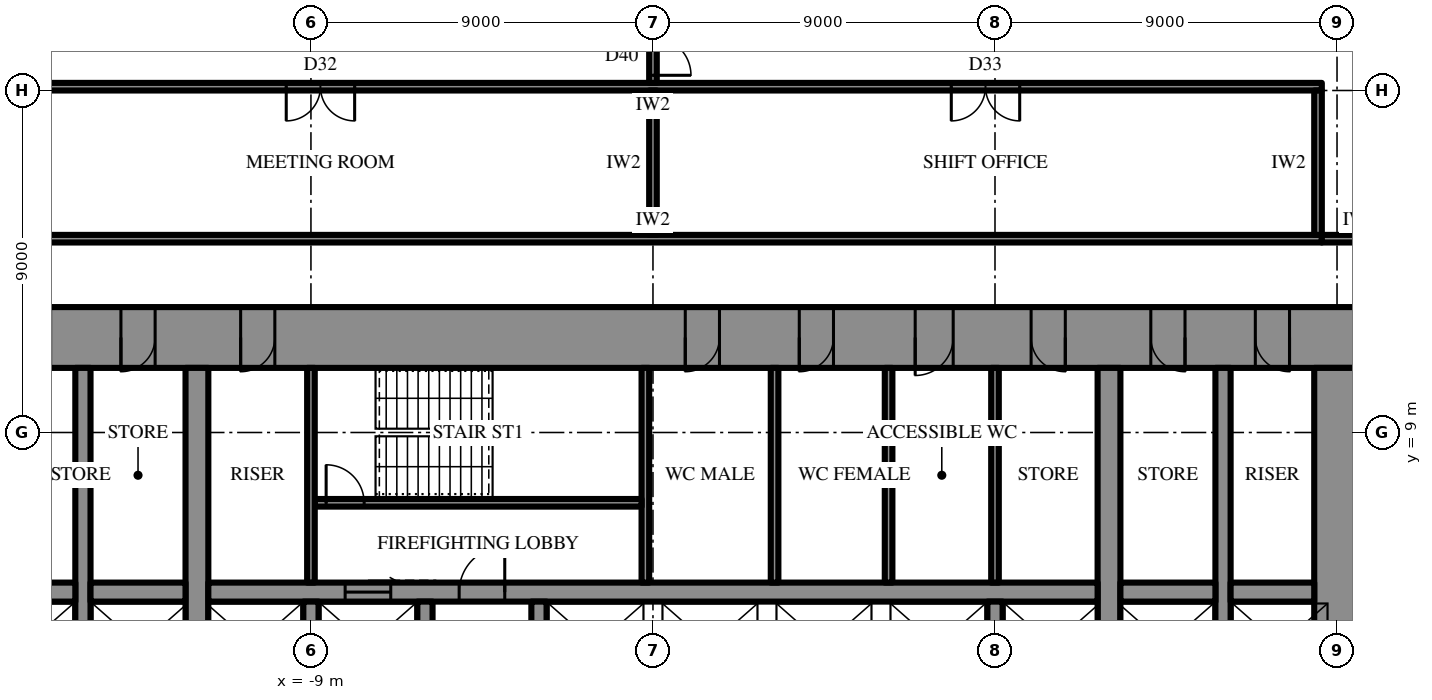
"""IFC4 building model, lengths in metres.
Left out: names, types, materials, properties, quantities, classifications, styles, units other than length and angle.
Written with IfcOpenShell. Run it as: python <this file> out.ifc"""

import sys

from ifc_helpers import new_model, si_unit, direction, frame, frame_2d, origin, place, context, subcontext, project, spatial, rectangle, extrude, element, fill, save


model = new_model("IFC4")
c1 = context("Model", 3, precision=1e-05, world=origin(), true_north=direction((0.0, 1.0)))
c2 = subcontext(c1, "Body", "Model", "MODEL_VIEW")
j1 = project(units=[si_unit("LENGTHUNIT", "METRE"), si_unit("PLANEANGLEUNIT", "RADIAN")], contexts=[c1])
p1 = place(None, origin())
s1 = spatial("IfcSite", under=j1, at=p1, CompositionType="ELEMENT")
p2 = place(p1, origin())
s2 = spatial("IfcBuilding", under=s1, at=p2, CompositionType="ELEMENT")
p3 = place(p2, frame((0.0, 0.0, 27.7)))
s3 = spatial("IfcBuildingStorey", under=s2, at=p3, CompositionType="ELEMENT", Elevation=27.7)
p4 = place(p3, frame((-18.6, 11.5, 0.0), z_axis=(0.0, 0.0, 1.0), x_axis=(1.0, 0.0, 0.0)))
e1 = element("IfcWall", 1, at=p4, inside=s3, PredefinedType="SHEAR", context=c2, shape_type="SweptSolid", body=[
    extrude(rectangle(XDim=37.2, YDim=1.6, at=frame_2d((18.6, 0.0))), origin(), (0.0, 0.0, 1.0), 4.2),
])
p5 = place(p4, frame((19.45, 0.0, 0.0)))
e2 = element("IfcOpeningElement", 2, at=p5, cuts=e1, PredefinedType="OPENING", context=c2, shape_type="SweptSolid", body=[
    extrude(rectangle(XDim=0.9, YDim=2.2, at=frame_2d((0.45, 1.1))), frame((0.0, 0.81, 0.0), z_axis=(0.0, -1.0, 0.0), x_axis=(1.0, 0.0, 0.0)), (0.0, 0.0, 1.0), 1.62),
])
p6 = place(p4, frame((22.45, 0.0, 0.0)))
e3 = element("IfcOpeningElement", 3, at=p6, cuts=e1, PredefinedType="OPENING", context=c2, shape_type="SweptSolid", body=[
    extrude(rectangle(XDim=0.9, YDim=2.2, at=frame_2d((0.45, 1.1))), frame((0.0, 0.81, 0.0), z_axis=(0.0, -1.0, 0.0), x_axis=(1.0, 0.0, 0.0)), (0.0, 0.0, 1.0), 1.62),
])
p7 = place(p4, frame((25.5, 0.0, 0.0)))
e4 = element("IfcOpeningElement", 4, at=p7, cuts=e1, PredefinedType="OPENING", context=c2, shape_type="SweptSolid", body=[
    extrude(rectangle(XDim=1.0, YDim=2.2, at=frame_2d((0.5, 1.1))), frame((0.0, 0.81, 0.0), z_axis=(0.0, -1.0, 0.0), x_axis=(1.0, 0.0, 0.0)), (0.0, 0.0, 1.0), 1.62),
])
p8 = place(p4, frame((1.85, 0.0, 0.0)))
e5 = element("IfcOpeningElement", 5, at=p8, cuts=e1, PredefinedType="OPENING", context=c2, shape_type="SweptSolid", body=[
    extrude(rectangle(XDim=0.9, YDim=2.2, at=frame_2d((0.45, 1.1))), frame((0.0, 0.81, 0.0), z_axis=(0.0, -1.0, 0.0), x_axis=(1.0, 0.0, 0.0)), (0.0, 0.0, 1.0), 1.62),
])
p9 = place(p4, frame((4.6, 0.0, 0.0)))
e6 = element("IfcOpeningElement", 6, at=p9, cuts=e1, PredefinedType="OPENING", context=c2, shape_type="SweptSolid", body=[
    extrude(rectangle(XDim=0.9, YDim=2.2, at=frame_2d((0.45, 1.1))), frame((0.0, 0.81, 0.0), z_axis=(0.0, -1.0, 0.0), x_axis=(1.0, 0.0, 0.0)), (0.0, 0.0, 1.0), 1.62),
])
p10 = place(p4, frame((7.75, 0.0, 0.0)))
e7 = element("IfcOpeningElement", 7, at=p10, cuts=e1, PredefinedType="OPENING", context=c2, shape_type="SweptSolid", body=[
    extrude(rectangle(XDim=0.9, YDim=2.2, at=frame_2d((0.45, 1.1))), frame((0.0, 0.81, 0.0), z_axis=(0.0, -1.0, 0.0), x_axis=(1.0, 0.0, 0.0)), (0.0, 0.0, 1.0), 1.62),
])
p11 = place(p4, frame((28.55, 0.0, 0.0)))
e8 = element("IfcOpeningElement", 8, at=p11, cuts=e1, PredefinedType="OPENING", context=c2, shape_type="SweptSolid", body=[
    extrude(rectangle(XDim=0.9, YDim=2.2, at=frame_2d((0.45, 1.1))), frame((0.0, 0.81, 0.0), z_axis=(0.0, -1.0, 0.0), x_axis=(1.0, 0.0, 0.0)), (0.0, 0.0, 1.0), 1.62),
])
p12 = place(p4, frame((31.7, 0.0, 0.0)))
e9 = element("IfcOpeningElement", 9, at=p12, cuts=e1, PredefinedType="OPENING", context=c2, shape_type="SweptSolid", body=[
    extrude(rectangle(XDim=0.9, YDim=2.2, at=frame_2d((0.45, 1.1))), frame((0.0, 0.81, 0.0), z_axis=(0.0, -1.0, 0.0), x_axis=(1.0, 0.0, 0.0)), (0.0, 0.0, 1.0), 1.62),
])
p13 = place(p4, frame((34.45, 0.0, 0.0)))
e10 = element("IfcOpeningElement", 10, at=p13, cuts=e1, PredefinedType="OPENING", context=c2, shape_type="SweptSolid", body=[
    extrude(rectangle(XDim=0.9, YDim=2.2, at=frame_2d((0.45, 1.1))), frame((0.0, 0.81, 0.0), z_axis=(0.0, -1.0, 0.0), x_axis=(1.0, 0.0, 0.0)), (0.0, 0.0, 1.0), 1.62),
])
p14 = place(p3, frame((18.0, -10.7, 0.0), z_axis=(0.0, 0.0, 1.0), x_axis=(0.0, 1.0, 0.0)))
e11 = element("IfcWall", 11, at=p14, inside=s3, PredefinedType="SHEAR", context=c2, shape_type="SweptSolid", body=[
    extrude(rectangle(XDim=21.4, YDim=1.2, at=frame_2d((10.7, 0.0))), origin(), (0.0, 0.0, 1.0), 4.2),
])
p15 = place(p14, frame((9.8, 0.0, 0.0)))
e12 = element("IfcOpeningElement", 12, at=p15, cuts=e11, PredefinedType="OPENING", context=c2, shape_type="SweptSolid", body=[
    extrude(rectangle(XDim=1.8, YDim=2.4, at=frame_2d((0.9, 1.2))), frame((0.0, 0.61, 0.0), z_axis=(0.0, -1.0, 0.0), x_axis=(1.0, 0.0, 0.0)), (0.0, 0.0, 1.0), 1.22),
])
p16 = place(p3, frame((12.0, -10.7, 0.0), z_axis=(0.0, 0.0, 1.0), x_axis=(0.0, 1.0, 0.0)))
e13 = element("IfcWall", 13, at=p16, inside=s3, PredefinedType="SHEAR", context=c2, shape_type="SweptSolid", body=[
    extrude(rectangle(XDim=21.4, YDim=0.6, at=frame_2d((10.7, 0.0))), origin(), (0.0, 0.0, 1.0), 4.2),
])
p17 = place(p16, frame((9.8, 0.0, 0.0)))
e14 = element("IfcOpeningElement", 14, at=p17, cuts=e13, PredefinedType="OPENING", context=c2, shape_type="SweptSolid", body=[
    extrude(rectangle(XDim=1.8, YDim=2.4, at=frame_2d((0.9, 1.2))), frame((0.0, 0.31, 0.0), z_axis=(0.0, -1.0, 0.0), x_axis=(1.0, 0.0, 0.0)), (0.0, 0.0, 1.0), 0.62),
])
p18 = place(p3, frame((-12.0, -10.7, 0.0), z_axis=(0.0, 0.0, 1.0), x_axis=(0.0, 1.0, 0.0)))
e15 = element("IfcWall", 15, at=p18, inside=s3, PredefinedType="SHEAR", context=c2, shape_type="SweptSolid", body=[
    extrude(rectangle(XDim=21.4, YDim=0.6, at=frame_2d((10.7, 0.0))), origin(), (0.0, 0.0, 1.0), 4.2),
])
p19 = place(p18, frame((9.8, 0.0, 0.0)))
e16 = element("IfcOpeningElement", 16, at=p19, cuts=e15, PredefinedType="OPENING", context=c2, shape_type="SweptSolid", body=[
    extrude(rectangle(XDim=1.8, YDim=2.4, at=frame_2d((0.9, 1.2))), frame((0.0, 0.31, 0.0), z_axis=(0.0, -1.0, 0.0), x_axis=(1.0, 0.0, 0.0)), (0.0, 0.0, 1.0), 0.62),
])
p20 = place(p3, frame((15.0, -10.7, 0.0), z_axis=(0.0, 0.0, 1.0), x_axis=(0.0, 1.0, 0.0)))
e17 = element("IfcWall", 17, at=p20, inside=s3, PredefinedType="SHEAR", context=c2, shape_type="SweptSolid", body=[
    extrude(rectangle(XDim=21.4, YDim=0.4, at=frame_2d((10.7, 0.0))), origin(), (0.0, 0.0, 1.0), 4.2),
])
p21 = place(p20, frame((9.8, 0.0, 0.0)))
e18 = element("IfcOpeningElement", 18, at=p21, cuts=e17, PredefinedType="OPENING", context=c2, shape_type="SweptSolid", body=[
    extrude(rectangle(XDim=1.8, YDim=2.4, at=frame_2d((0.9, 1.2))), frame((0.0, 0.21, 0.0), z_axis=(0.0, -1.0, 0.0), x_axis=(1.0, 0.0, 0.0)), (0.0, 0.0, 1.0), 0.42),
])
p22 = place(p3, frame((-15.0, -10.7, 0.0), z_axis=(0.0, 0.0, 1.0), x_axis=(0.0, 1.0, 0.0)))
e19 = element("IfcWall", 19, at=p22, inside=s3, PredefinedType="SHEAR", context=c2, shape_type="SweptSolid", body=[
    extrude(rectangle(XDim=21.4, YDim=0.4, at=frame_2d((10.7, 0.0))), origin(), (0.0, 0.0, 1.0), 4.2),
])
p23 = place(p22, frame((9.8, 0.0, 0.0)))
e20 = element("IfcOpeningElement", 20, at=p23, cuts=e19, PredefinedType="OPENING", context=c2, shape_type="SweptSolid", body=[
    extrude(rectangle(XDim=1.8, YDim=2.4, at=frame_2d((0.9, 1.2))), frame((0.0, 0.21, 0.0), z_axis=(0.0, -1.0, 0.0), x_axis=(1.0, 0.0, 0.0)), (0.0, 0.0, 1.0), 0.42),
])
p24 = place(p3, frame((-17.4, 4.8, 0.0), z_axis=(0.0, 0.0, 1.0), x_axis=(1.0, 0.0, 0.0)))
e21 = element("IfcWall", 21, at=p24, inside=s3, PredefinedType="SHEAR", context=c2, shape_type="SweptSolid", body=[
    extrude(rectangle(XDim=2.2, YDim=0.5, at=frame_2d((1.1, 0.0))), origin(), (0.0, 0.0, 1.0), 4.2),
])
p25 = place(p3, frame((-14.8, 4.8, 0.0), z_axis=(0.0, 0.0, 1.0), x_axis=(1.0, 0.0, 0.0)))
e22 = element("IfcWall", 22, at=p25, inside=s3, PredefinedType="SHEAR", context=c2, shape_type="SweptSolid", body=[
    extrude(rectangle(XDim=2.5, YDim=0.5, at=frame_2d((1.25, 0.0))), origin(), (0.0, 0.0, 1.0), 4.2),
])
p26 = place(p3, frame((-11.7, 4.8, 0.0), z_axis=(0.0, 0.0, 1.0), x_axis=(1.0, 0.0, 0.0)))
e23 = element("IfcWall", 23, at=p26, inside=s3, PredefinedType="SHEAR", context=c2, shape_type="SweptSolid", body=[
    extrude(rectangle(XDim=23.4, YDim=0.5, at=frame_2d((11.7, 0.0))), origin(), (0.0, 0.0, 1.0), 4.2),
])
p27 = place(p26, frame((6.6, 0.0, 0.0)))
e24 = element("IfcOpeningElement", 24, at=p27, cuts=e23, PredefinedType="OPENING", context=c2, shape_type="SweptSolid", body=[
    extrude(rectangle(XDim=1.2, YDim=2.2, at=frame_2d((0.6, 1.1))), frame((0.0, 0.26, 0.0), z_axis=(0.0, -1.0, 0.0), x_axis=(1.0, 0.0, 0.0)), (0.0, 0.0, 1.0), 0.52),
])
p28 = place(p26, frame((3.6, 0.0, 0.0)))
e25 = element("IfcOpeningElement", 25, at=p28, cuts=e23, PredefinedType="OPENING", context=c2, shape_type="SweptSolid", body=[
    extrude(rectangle(XDim=1.2, YDim=2.2, at=frame_2d((0.6, 1.1))), frame((0.0, 0.26, 0.0), z_axis=(0.0, -1.0, 0.0), x_axis=(1.0, 0.0, 0.0)), (0.0, 0.0, 1.0), 0.52),
])
p29 = place(p3, frame((12.3, 4.8, 0.0), z_axis=(0.0, 0.0, 1.0), x_axis=(1.0, 0.0, 0.0)))
e26 = element("IfcWall", 26, at=p29, inside=s3, PredefinedType="SHEAR", context=c2, shape_type="SweptSolid", body=[
    extrude(rectangle(XDim=2.5, YDim=0.5, at=frame_2d((1.25, 0.0))), origin(), (0.0, 0.0, 1.0), 4.2),
])
p30 = place(p3, frame((15.2, 4.8, 0.0), z_axis=(0.0, 0.0, 1.0), x_axis=(1.0, 0.0, 0.0)))
e27 = element("IfcWall", 27, at=p30, inside=s3, PredefinedType="SHEAR", context=c2, shape_type="SweptSolid", body=[
    extrude(rectangle(XDim=2.2, YDim=0.5, at=frame_2d((1.1, 0.0))), origin(), (0.0, 0.0, 1.0), 4.2),
])
for number, where, z_axis, x_axis in (
    (28, (-9.0, 2.25, 0.0), (0.0, 0.0, 1.0), (0.0, 1.0, 0.0)),
    (29, (-6.0, 2.25, 0.0), (0.0, 0.0, 1.0), (0.0, 1.0, 0.0)),
    (30, (-3.0, 2.25, 0.0), (0.0, 0.0, 1.0), (0.0, 1.0, 0.0)),
    (31, (9.0, 2.25, 0.0), (0.0, 0.0, 1.0), (0.0, 1.0, 0.0)),
):
    element("IfcWall", number, at=place(p3, frame(where, z_axis=z_axis, x_axis=x_axis)), inside=s3, PredefinedType="SHEAR", context=c2, shape_type="SweptSolid", body=[
        extrude(rectangle(XDim=2.3, YDim=0.4, at=frame_2d((1.15, 0.0))), origin(), (0.0, 0.0, 1.0), 4.2),
    ])
p31 = place(p3, frame((-0.2, 5.05, 0.0), z_axis=(0.0, 0.0, 1.0), x_axis=(0.0, 1.0, 0.0)))
e32 = element("IfcWall", 32, at=p31, inside=s3, PredefinedType="SHEAR", context=c2, shape_type="SweptSolid", body=[
    extrude(rectangle(XDim=5.65, YDim=0.2, at=frame_2d((2.825, 0.0))), origin(), (0.0, 0.0, 1.0), 4.2),
])
p32 = place(p3, frame((-8.9, 7.15, 0.0), z_axis=(0.0, 0.0, 1.0), x_axis=(1.0, 0.0, 0.0)))
e33 = element("IfcWall", 33, at=p32, inside=s3, PredefinedType="SHEAR", context=c2, shape_type="SweptSolid", body=[
    extrude(rectangle(XDim=8.6, YDim=0.2, at=frame_2d((4.3, 0.0))), origin(), (0.0, 0.0, 1.0), 4.2),
])
p33 = place(p32, frame((0.3, 0.0, 0.0)))
e34 = element("IfcOpeningElement", 34, at=p33, cuts=e33, PredefinedType="OPENING", context=c2, shape_type="SweptSolid", body=[
    extrude(rectangle(XDim=1.0, YDim=2.2, at=frame_2d((0.5, 1.1))), frame((0.0, 0.11, 0.0), z_axis=(0.0, -1.0, 0.0), x_axis=(1.0, 0.0, 0.0)), (0.0, 0.0, 1.0), 0.22),
])
for number, where, z_axis, x_axis in (
    (35, (-9.0, 5.05, 0.0), (0.0, 0.0, 1.0), (0.0, 1.0, 0.0)),
    (36, (9.0, 5.05, 0.0), (0.0, 0.0, 1.0), (0.0, 1.0, 0.0)),
    (37, (3.2, 5.05, 0.0), (0.0, 0.0, 1.0), (0.0, 1.0, 0.0)),
    (38, (6.2, 5.05, 0.0), (0.0, 0.0, 1.0), (0.0, 1.0, 0.0)),
):
    element("IfcWall", number, at=place(p3, frame(where, z_axis=z_axis, x_axis=x_axis)), inside=s3, PredefinedType="PARTITIONING", context=c2, shape_type="SweptSolid", body=[
        extrude(rectangle(XDim=5.65, YDim=0.2, at=frame_2d((2.825, 0.0))), origin(), (0.0, 0.0, 1.0), 4.0),
    ])
p34 = place(p3, frame((-17.6, 14.1, 0.0), z_axis=(0.0, 0.0, 1.0), x_axis=(1.0, 0.0, 0.0)))
e39 = element("IfcWall", 39, at=p34, inside=s3, PredefinedType="PARTITIONING", context=c2, shape_type="SweptSolid", body=[
    extrude(rectangle(XDim=35.2, YDim=0.2, at=frame_2d((17.6, 0.0))), origin(), (0.0, 0.0, 1.0), 4.0),
])
p35 = place(p3, frame((-17.6, 18.1, 0.0), z_axis=(0.0, 0.0, 1.0), x_axis=(1.0, 0.0, 0.0)))
e40 = element("IfcWall", 40, at=p35, inside=s3, PredefinedType="PARTITIONING", context=c2, shape_type="SweptSolid", body=[
    extrude(rectangle(XDim=35.2, YDim=0.2, at=frame_2d((17.6, 0.0))), origin(), (0.0, 0.0, 1.0), 4.0),
])
p36 = place(p35, frame((7.95, 0.0, 0.0)))
e41 = element("IfcOpeningElement", 41, at=p36, cuts=e40, PredefinedType="OPENING", context=c2, shape_type="SweptSolid", body=[
    extrude(rectangle(XDim=1.8, YDim=2.4, at=frame_2d((0.9, 1.2))), frame((0.0, 0.11, 0.0), z_axis=(0.0, -1.0, 0.0), x_axis=(1.0, 0.0, 0.0)), (0.0, 0.0, 1.0), 0.22),
])
p37 = place(p35, frame((25.45, 0.0, 0.0)))
e42 = element("IfcOpeningElement", 42, at=p37, cuts=e40, PredefinedType="OPENING", context=c2, shape_type="SweptSolid", body=[
    extrude(rectangle(XDim=1.8, YDim=2.4, at=frame_2d((0.9, 1.2))), frame((0.0, 0.11, 0.0), z_axis=(0.0, -1.0, 0.0), x_axis=(1.0, 0.0, 0.0)), (0.0, 0.0, 1.0), 0.22),
])
p38 = place(p3, frame((0.0, 14.2, 0.0), z_axis=(0.0, 0.0, 1.0), x_axis=(0.0, 1.0, 0.0)))
e43 = element("IfcWall", 43, at=p38, inside=s3, PredefinedType="PARTITIONING", context=c2, shape_type="SweptSolid", body=[
    extrude(rectangle(XDim=3.8, YDim=0.2, at=frame_2d((1.9, 0.0))), origin(), (0.0, 0.0, 1.0), 2.944),
])
p39 = place(p3, frame((17.5, 14.2, 0.0), z_axis=(0.0, 0.0, 1.0), x_axis=(0.0, 1.0, 0.0)))
e44 = element("IfcWall", 44, at=p39, inside=s3, PredefinedType="PARTITIONING", context=c2, shape_type="SweptSolid", body=[
    extrude(rectangle(XDim=3.8, YDim=0.2, at=frame_2d((1.9, 0.0))), origin(), (0.0, 0.0, 1.0), 4.0),
])
p40 = place(p3, frame((17.6, 14.1, 0.0), z_axis=(0.0, 0.0, 1.0), x_axis=(1.0, 0.0, 0.0)))
e45 = element("IfcWall", 45, at=p40, inside=s3, PredefinedType="PARTITIONING", context=c2, shape_type="SweptSolid", body=[
    extrude(rectangle(XDim=2.0, YDim=0.2, at=frame_2d((1.0, 0.0))), origin(), (0.0, 0.0, 1.0), 4.0),
])
p41 = place(p3, frame((0.0, 18.2, 0.0), z_axis=(0.0, 0.0, 1.0), x_axis=(0.0, 1.0, 0.0)))
e46 = element("IfcWall", 46, at=p41, inside=s3, PredefinedType="PARTITIONING", context=c2, shape_type="SweptSolid", body=[
    extrude(rectangle(XDim=6.7, YDim=0.2, at=frame_2d((3.35, 0.0))), origin(), (0.0, 0.0, 1.0), 2.944),
])
p42 = place(p41, frame((0.2, 0.0, 0.0)))
e47 = element("IfcOpeningElement", 47, at=p42, cuts=e46, PredefinedType="OPENING", context=c2, shape_type="SweptSolid", body=[
    extrude(rectangle(XDim=1.0, YDim=2.2, at=frame_2d((0.5, 1.1))), frame((0.0, 0.11, 0.0), z_axis=(0.0, -1.0, 0.0), x_axis=(1.0, 0.0, 0.0)), (0.0, 0.0, 1.0), 0.22),
])
p43 = place(p27, origin())
e48 = element("IfcDoor", 48, at=p43, inside=s3, OperationType="SINGLE_SWING_LEFT", PredefinedType="DOOR", context=c2, shape_type="SweptSolid", body=[
    extrude(rectangle(XDim=1.2, YDim=2.2, at=frame_2d((0.6, 1.1))), frame((0.0, 0.025, 0.0), z_axis=(0.0, -1.0, 0.0), x_axis=(1.0, 0.0, 0.0)), (0.0, 0.0, 1.0), 0.05),
])
fill(e24, e48)
p44 = place(p33, origin())
e49 = element("IfcDoor", 49, at=p44, inside=s3, OperationType="SINGLE_SWING_RIGHT", PredefinedType="DOOR", context=c2, shape_type="SweptSolid", body=[
    extrude(rectangle(XDim=1.0, YDim=2.2, at=frame_2d((0.5, 1.1))), frame((0.0, 0.025, 0.0), z_axis=(0.0, -1.0, 0.0), x_axis=(1.0, 0.0, 0.0)), (0.0, 0.0, 1.0), 0.05),
])
fill(e34, e49)
p45 = place(p5, frame((0.9, 0.0, 0.0), z_axis=(0.0, 0.0, 1.0), x_axis=(-1.0, 0.0, 0.0)))
e50 = element("IfcDoor", 50, at=p45, inside=s3, OperationType="SINGLE_SWING_LEFT", PredefinedType="DOOR", context=c2, shape_type="SweptSolid", body=[
    extrude(rectangle(XDim=0.9, YDim=2.2, at=frame_2d((0.45, 1.1))), frame((0.0, 0.025, 0.0), z_axis=(0.0, -1.0, 0.0), x_axis=(1.0, 0.0, 0.0)), (0.0, 0.0, 1.0), 0.05),
])
fill(e2, e50)
p46 = place(p6, frame((0.9, 0.0, 0.0), z_axis=(0.0, 0.0, 1.0), x_axis=(-1.0, 0.0, 0.0)))
e51 = element("IfcDoor", 51, at=p46, inside=s3, OperationType="SINGLE_SWING_LEFT", PredefinedType="DOOR", context=c2, shape_type="SweptSolid", body=[
    extrude(rectangle(XDim=0.9, YDim=2.2, at=frame_2d((0.45, 1.1))), frame((0.0, 0.025, 0.0), z_axis=(0.0, -1.0, 0.0), x_axis=(1.0, 0.0, 0.0)), (0.0, 0.0, 1.0), 0.05),
])
fill(e3, e51)
p47 = place(p7, frame((1.0, 0.0, 0.0), z_axis=(0.0, 0.0, 1.0), x_axis=(-1.0, 0.0, 0.0)))
e52 = element("IfcDoor", 52, at=p47, inside=s3, OperationType="SINGLE_SWING_LEFT", PredefinedType="DOOR", context=c2, shape_type="SweptSolid", body=[
    extrude(rectangle(XDim=1.0, YDim=2.2, at=frame_2d((0.5, 1.1))), frame((0.0, 0.025, 0.0), z_axis=(0.0, -1.0, 0.0), x_axis=(1.0, 0.0, 0.0)), (0.0, 0.0, 1.0), 0.05),
])
fill(e4, e52)
p48 = place(p9, frame((0.9, 0.0, 0.0), z_axis=(0.0, 0.0, 1.0), x_axis=(-1.0, 0.0, 0.0)))
e53 = element("IfcDoor", 53, at=p48, inside=s3, OperationType="SINGLE_SWING_LEFT", PredefinedType="DOOR", context=c2, shape_type="SweptSolid", body=[
    extrude(rectangle(XDim=0.9, YDim=2.2, at=frame_2d((0.45, 1.1))), frame((0.0, 0.025, 0.0), z_axis=(0.0, -1.0, 0.0), x_axis=(1.0, 0.0, 0.0)), (0.0, 0.0, 1.0), 0.05),
])
fill(e6, e53)
p49 = place(p10, frame((0.9, 0.0, 0.0), z_axis=(0.0, 0.0, 1.0), x_axis=(-1.0, 0.0, 0.0)))
e54 = element("IfcDoor", 54, at=p49, inside=s3, OperationType="SINGLE_SWING_LEFT", PredefinedType="DOOR", context=c2, shape_type="SweptSolid", body=[
    extrude(rectangle(XDim=0.9, YDim=2.2, at=frame_2d((0.45, 1.1))), frame((0.0, 0.025, 0.0), z_axis=(0.0, -1.0, 0.0), x_axis=(1.0, 0.0, 0.0)), (0.0, 0.0, 1.0), 0.05),
])
fill(e7, e54)
p50 = place(p11, frame((0.9, 0.0, 0.0), z_axis=(0.0, 0.0, 1.0), x_axis=(-1.0, 0.0, 0.0)))
e55 = element("IfcDoor", 55, at=p50, inside=s3, OperationType="SINGLE_SWING_RIGHT", PredefinedType="DOOR", context=c2, shape_type="SweptSolid", body=[
    extrude(rectangle(XDim=0.9, YDim=2.2, at=frame_2d((0.45, 1.1))), frame((0.0, 0.025, 0.0), z_axis=(0.0, -1.0, 0.0), x_axis=(1.0, 0.0, 0.0)), (0.0, 0.0, 1.0), 0.05),
])
fill(e8, e55)
p51 = place(p12, frame((0.9, 0.0, 0.0), z_axis=(0.0, 0.0, 1.0), x_axis=(-1.0, 0.0, 0.0)))
e56 = element("IfcDoor", 56, at=p51, inside=s3, OperationType="SINGLE_SWING_RIGHT", PredefinedType="DOOR", context=c2, shape_type="SweptSolid", body=[
    extrude(rectangle(XDim=0.9, YDim=2.2, at=frame_2d((0.45, 1.1))), frame((0.0, 0.025, 0.0), z_axis=(0.0, -1.0, 0.0), x_axis=(1.0, 0.0, 0.0)), (0.0, 0.0, 1.0), 0.05),
])
fill(e9, e56)
p52 = place(p13, frame((0.9, 0.0, 0.0), z_axis=(0.0, 0.0, 1.0), x_axis=(-1.0, 0.0, 0.0)))
e57 = element("IfcDoor", 57, at=p52, inside=s3, OperationType="SINGLE_SWING_RIGHT", PredefinedType="DOOR", context=c2, shape_type="SweptSolid", body=[
    extrude(rectangle(XDim=0.9, YDim=2.2, at=frame_2d((0.45, 1.1))), frame((0.0, 0.025, 0.0), z_axis=(0.0, -1.0, 0.0), x_axis=(1.0, 0.0, 0.0)), (0.0, 0.0, 1.0), 0.05),
])
fill(e10, e57)
p53 = place(p28, origin())
e58 = element("IfcDoor", 58, at=p53, inside=s3, OperationType="SLIDING_TO_LEFT", PredefinedType="DOOR", context=c2, shape_type="SweptSolid", body=[
    extrude(rectangle(XDim=1.2, YDim=2.2, at=frame_2d((0.6, 1.1))), frame((0.0, 0.025, 0.0), z_axis=(0.0, -1.0, 0.0), x_axis=(1.0, 0.0, 0.0)), (0.0, 0.0, 1.0), 0.05),
])
fill(e25, e58)
p54 = place(p36, frame((1.8, 0.0, 0.0), z_axis=(0.0, 0.0, 1.0), x_axis=(-1.0, 0.0, 0.0)))
e59 = element("IfcDoor", 59, at=p54, inside=s3, OperationType="DOUBLE_DOOR_SINGLE_SWING", PredefinedType="DOOR", context=c2, shape_type="SweptSolid", body=[
    extrude(rectangle(XDim=1.8, YDim=2.4, at=frame_2d((0.9, 1.2))), frame((0.0, 0.025, 0.0), z_axis=(0.0, -1.0, 0.0), x_axis=(1.0, 0.0, 0.0)), (0.0, 0.0, 1.0), 0.05),
])
fill(e41, e59)
p55 = place(p37, frame((1.8, 0.0, 0.0), z_axis=(0.0, 0.0, 1.0), x_axis=(-1.0, 0.0, 0.0)))
e60 = element("IfcDoor", 60, at=p55, inside=s3, OperationType="DOUBLE_DOOR_SINGLE_SWING", PredefinedType="DOOR", context=c2, shape_type="SweptSolid", body=[
    extrude(rectangle(XDim=1.8, YDim=2.4, at=frame_2d((0.9, 1.2))), frame((0.0, 0.025, 0.0), z_axis=(0.0, -1.0, 0.0), x_axis=(1.0, 0.0, 0.0)), (0.0, 0.0, 1.0), 0.05),
])
fill(e42, e60)
p56 = place(p42, frame((1.0, 0.0, 0.0), z_axis=(0.0, 0.0, 1.0), x_axis=(-1.0, 0.0, 0.0)))
e61 = element("IfcDoor", 61, at=p56, inside=s3, OperationType="SINGLE_SWING_LEFT", PredefinedType="DOOR", context=c2, shape_type="SweptSolid", body=[
    extrude(rectangle(XDim=1.0, YDim=2.2, at=frame_2d((0.5, 1.1))), frame((0.0, 0.025, 0.0), z_axis=(0.0, -1.0, 0.0), x_axis=(1.0, 0.0, 0.0)), (0.0, 0.0, 1.0), 0.05),
])
fill(e47, e61)
save(model, sys.argv[1])
